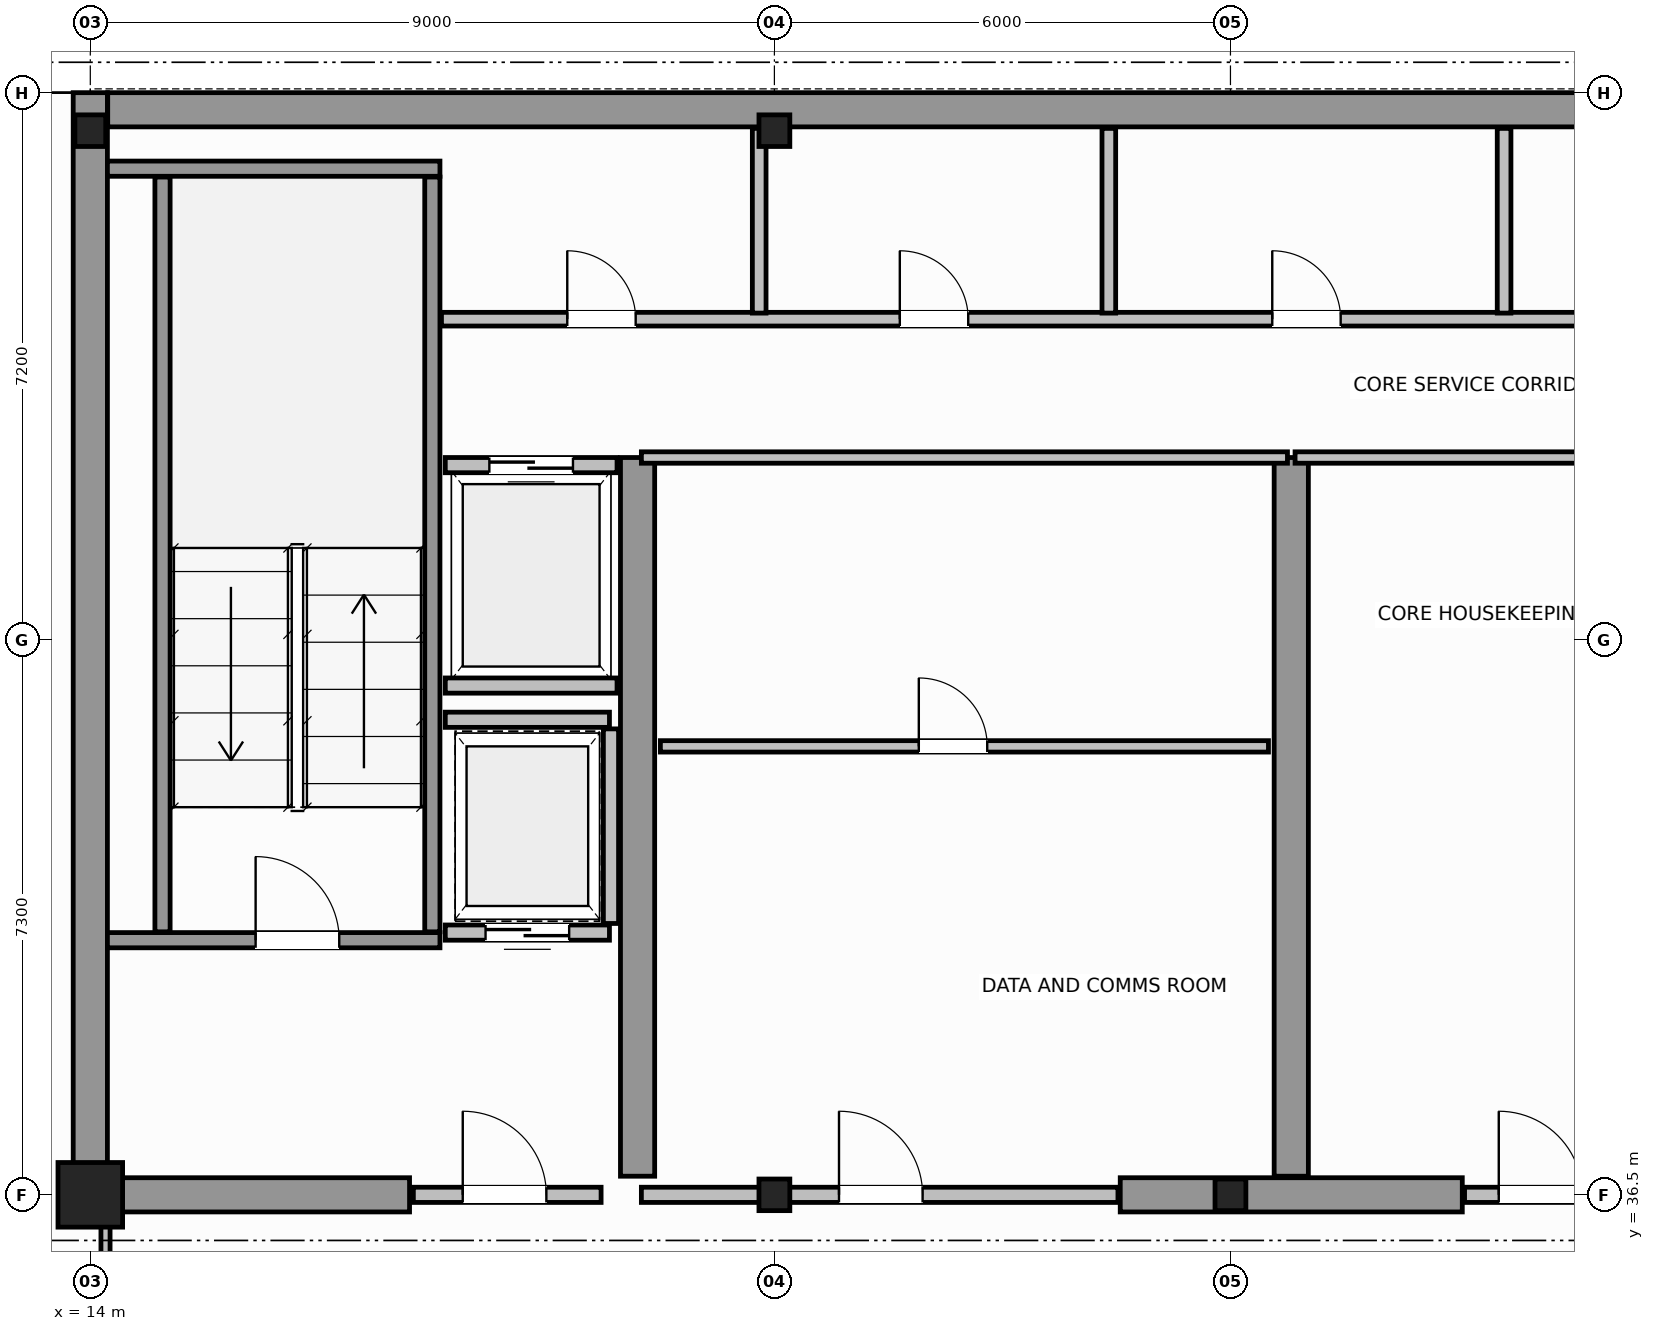
"""IFC4 building model, lengths in metres.
Left out: names, types, materials, properties, quantities, classifications, styles, units other than length and angle.
Written with IfcOpenShell. Run it as: python <this file> out.ifc"""

import sys

from ifc_helpers import new_model, si_unit, direction, frame, frame_2d, origin, origin_2d, place, context, subcontext, project, spatial, rectangle, i_section, extrude, source, transform, mapped, element, fill, save


model = new_model("IFC4")
c1 = context("Model", 3, precision=1e-05, world=origin(), true_north=direction((0.0, 1.0)))
c2 = subcontext(c1, "Body", "Model", "MODEL_VIEW")
j1 = project(units=[si_unit("LENGTHUNIT", "METRE"), si_unit("PLANEANGLEUNIT", "RADIAN")], contexts=[c1])
p1 = place(None, origin())
s1 = spatial("IfcSite", under=j1, at=p1, CompositionType="ELEMENT")
p2 = place(p1, origin())
s2 = spatial("IfcBuilding", under=s1, at=p2, CompositionType="ELEMENT")
p3 = place(p2, frame((0.0, 0.0, 280.2)))
s3 = spatial("IfcBuildingStorey", under=s2, at=p3, CompositionType="ELEMENT", Elevation=280.2)
m1 = source(origin(), c2, "Body", "SweptSolid", [
    extrude(rectangle(XDim=0.85, YDim=0.85, at=origin_2d()), origin(), (0.0, 0.0, 1.0), 3.8),
])
p4 = place(p3, frame((14.0, 36.5, 0.0), z_axis=(0.0, 0.0, 1.0), x_axis=(1.0, 0.0, 0.0)))
e1 = element("IfcColumn", 1, at=p4, inside=s3, PredefinedType="COLUMN", context=c2, shape_type="MappedRepresentation", body=[
    mapped(m1, transform((0.0, 0.0, 0.0), scale=1.0)),
])
m2 = source(origin(), c2, "Body", "SweptSolid", [
    extrude(i_section(OverallWidth=0.406, OverallDepth=0.416, WebThickness=0.03, FlangeThickness=0.042, FilletRadius=0.015, at=origin_2d()), origin(), (0.0, 0.0, 1.0), 3.8),
])
for number, where, z_axis, x_axis in (
    (2, (23.0, 36.5, 0.0), (0.0, 0.0, 1.0), (1.0, 0.0, 0.0)),
    (3, (29.0, 36.5, 0.0), (0.0, 0.0, 1.0), (1.0, 0.0, 0.0)),
    (4, (14.0, 50.5, 0.0), (0.0, 0.0, 1.0), (1.0, 0.0, 0.0)),
    (5, (23.0, 50.5, 0.0), (0.0, 0.0, 1.0), (1.0, 0.0, 0.0)),
):
    element("IfcColumn", number, at=place(p3, frame(where, z_axis=z_axis, x_axis=x_axis)), inside=s3, PredefinedType="COLUMN", context=c2, shape_type="MappedRepresentation", body=[
        mapped(m2, transform((0.0, 0.0, 0.0), scale=1.0)),
    ])
p5 = place(p3, frame((14.229, 50.775, 0.0), z_axis=(0.0, 0.0, 1.0), x_axis=(1.0, 0.0, 0.0)))
e6 = element("IfcWall", 6, at=p5, inside=s3, PredefinedType="SHEAR", context=c2, shape_type="SweptSolid", body=[
    extrude(rectangle(XDim=19.769, YDim=0.45, at=frame_2d((9.885, 0.0))), origin(), (0.0, 0.0, 1.0), 3.8),
])
p6 = place(p3, frame((14.0, 36.5, 0.0), z_axis=(0.0, 0.0, 1.0), x_axis=(0.0, 1.0, 0.0)))
e7 = element("IfcWall", 7, at=p6, inside=s3, PredefinedType="SHEAR", context=c2, shape_type="SweptSolid", body=[
    extrude(rectangle(XDim=14.5, YDim=0.45, at=frame_2d((7.25, 0.0))), origin(), (0.0, 0.0, 1.0), 3.8),
])
p7 = place(p3, frame((14.245, 36.5, 0.0), z_axis=(0.0, 0.0, 1.0), x_axis=(1.0, 0.0, 0.0)))
e8 = element("IfcWall", 8, at=p7, inside=s3, PredefinedType="SHEAR", context=c2, shape_type="SweptSolid", body=[
    extrude(rectangle(XDim=3.955, YDim=0.45, at=frame_2d((1.978, 0.0))), origin(), (0.0, 0.0, 1.0), 2.58),
])
p8 = place(p3, frame((27.55, 36.5, 0.0), z_axis=(0.0, 0.0, 1.0), x_axis=(1.0, 0.0, 0.0)))
e9 = element("IfcWall", 9, at=p8, inside=s3, PredefinedType="SHEAR", context=c2, shape_type="SweptSolid", body=[
    extrude(rectangle(XDim=4.5, YDim=0.45, at=frame_2d((2.25, 0.0))), origin(), (0.0, 0.0, 1.0), 3.8),
])
for number, where, z_axis, x_axis in (
    (10, (21.2, 36.745, 0.0), (0.0, 0.0, 1.0), (0.0, 1.0, 0.0)),
    (11, (29.8, 36.745, 0.0), (0.0, 0.0, 1.0), (0.0, 1.0, 0.0)),
):
    element("IfcWall", number, at=place(p3, frame(where, z_axis=z_axis, x_axis=x_axis)), inside=s3, PredefinedType="SHEAR", context=c2, shape_type="SweptSolid", body=[
        extrude(rectangle(XDim=9.455, YDim=0.45, at=frame_2d((4.728, 0.0))), origin(), (0.0, 0.0, 1.0), 3.8),
    ])
p9 = place(p3, frame((14.225, 39.85, 0.0), z_axis=(0.0, 0.0, 1.0), x_axis=(1.0, 0.0, 0.0)))
e12 = element("IfcWall", 12, at=p9, inside=s3, PredefinedType="SOLIDWALL", context=c2, shape_type="SweptSolid", body=[
    extrude(rectangle(XDim=4.375, YDim=0.2, at=frame_2d((2.188, 0.0))), origin(), (0.0, 0.0, 1.0), 3.8),
])
p10 = place(p9, frame((1.95, 0.0, 0.0)))
e13 = element("IfcOpeningElement", 13, at=p10, cuts=e12, PredefinedType="OPENING", context=c2, shape_type="SweptSolid", body=[
    extrude(rectangle(XDim=1.1, YDim=2.15, at=frame_2d((0.55, 1.075))), frame((0.0, 0.11, 0.0), z_axis=(0.0, -1.0, 0.0), x_axis=(1.0, 0.0, 0.0)), (0.0, 0.0, 1.0), 0.22),
])
p11 = place(p3, frame((14.225, 50.0, 0.0), z_axis=(0.0, 0.0, 1.0), x_axis=(1.0, 0.0, 0.0)))
e14 = element("IfcWall", 14, at=p11, inside=s3, PredefinedType="SOLIDWALL", context=c2, shape_type="SweptSolid", body=[
    extrude(rectangle(XDim=4.375, YDim=0.2, at=frame_2d((2.188, 0.0))), origin(), (0.0, 0.0, 1.0), 3.8),
])
for number, where, z_axis, x_axis in (
    (15, (14.95, 39.96, 0.0), (0.0, 0.0, 1.0), (0.0, 1.0, 0.0)),
    (16, (18.5, 39.96, 0.0), (0.0, 0.0, 1.0), (0.0, 1.0, 0.0)),
):
    element("IfcWall", number, at=place(p3, frame(where, z_axis=z_axis, x_axis=x_axis)), inside=s3, PredefinedType="SOLIDWALL", context=c2, shape_type="SweptSolid", body=[
        extrude(rectangle(XDim=9.93, YDim=0.2, at=frame_2d((4.965, 0.0))), origin(), (0.0, 0.0, 1.0), 3.8),
    ])
p12 = place(p3, frame((18.25, 36.5, 0.0), z_axis=(0.0, 0.0, 1.0), x_axis=(1.0, 0.0, 0.0)))
e17 = element("IfcWall", 17, at=p12, inside=s3, PredefinedType="SOLIDWALL", context=c2, shape_type="SweptSolid", body=[
    extrude(rectangle(XDim=2.47, YDim=0.2, at=frame_2d((1.235, 0.0))), origin(), (0.0, 0.0, 1.0), 2.57),
])
p13 = place(p12, frame((0.65, 0.0, 0.0)))
e18 = element("IfcOpeningElement", 18, at=p13, cuts=e17, PredefinedType="OPENING", context=c2, shape_type="SweptSolid", body=[
    extrude(rectangle(XDim=1.1, YDim=2.15, at=frame_2d((0.55, 1.075))), frame((0.0, 0.11, 0.0), z_axis=(0.0, -1.0, 0.0), x_axis=(1.0, 0.0, 0.0)), (0.0, 0.0, 1.0), 0.22),
])
p14 = place(p3, frame((18.67, 46.1, 0.0), z_axis=(0.0, 0.0, 1.0), x_axis=(1.0, 0.0, 0.0)))
e19 = element("IfcWall", 19, at=p14, inside=s3, PredefinedType="SOLIDWALL", context=c2, shape_type="SweptSolid", body=[
    extrude(rectangle(XDim=2.26, YDim=0.2, at=frame_2d((1.13, 0.0))), origin(), (0.0, 0.0, 1.0), 3.58),
])
p15 = place(p14, frame((0.58, 0.0, 0.0)))
e20 = element("IfcOpeningElement", 20, at=p15, cuts=e19, PredefinedType="OPENING", context=c2, shape_type="SweptSolid", body=[
    extrude(rectangle(XDim=1.1, YDim=2.15, at=frame_2d((0.55, 1.075))), frame((0.0, 0.11, 0.0), z_axis=(0.0, -1.0, 0.0), x_axis=(1.0, 0.0, 0.0)), (0.0, 0.0, 1.0), 0.22),
])
p16 = place(p3, frame((18.67, 43.2, 0.0), z_axis=(0.0, 0.0, 1.0), x_axis=(1.0, 0.0, 0.0)))
e21 = element("IfcWall", 21, at=p16, inside=s3, PredefinedType="SOLIDWALL", context=c2, shape_type="SweptSolid", body=[
    extrude(rectangle(XDim=2.26, YDim=0.2, at=frame_2d((1.13, 0.0))), origin(), (0.0, 0.0, 1.0), 3.58),
])
p17 = place(p3, frame((18.67, 39.95, 0.0), z_axis=(0.0, 0.0, 1.0), x_axis=(1.0, 0.0, 0.0)))
e22 = element("IfcWall", 22, at=p17, inside=s3, PredefinedType="SOLIDWALL", context=c2, shape_type="SweptSolid", body=[
    extrude(rectangle(XDim=2.16, YDim=0.2, at=frame_2d((1.08, 0.0))), origin(), (0.0, 0.0, 1.0), 3.58),
])
p18 = place(p17, frame((0.53, 0.0, 0.0)))
e23 = element("IfcOpeningElement", 23, at=p18, cuts=e22, PredefinedType="OPENING", context=c2, shape_type="SweptSolid", body=[
    extrude(rectangle(XDim=1.1, YDim=2.15, at=frame_2d((0.55, 1.075))), frame((0.0, 0.11, 0.0), z_axis=(0.0, -1.0, 0.0), x_axis=(1.0, 0.0, 0.0)), (0.0, 0.0, 1.0), 0.22),
])
p19 = place(p3, frame((18.67, 42.75, 0.0), z_axis=(0.0, 0.0, 1.0), x_axis=(1.0, 0.0, 0.0)))
e24 = element("IfcWall", 24, at=p19, inside=s3, PredefinedType="SOLIDWALL", context=c2, shape_type="SweptSolid", body=[
    extrude(rectangle(XDim=2.16, YDim=0.2, at=frame_2d((1.08, 0.0))), origin(), (0.0, 0.0, 1.0), 3.58),
])
p20 = place(p3, frame((20.85, 40.07, 0.0), z_axis=(0.0, 0.0, 1.0), x_axis=(0.0, 1.0, 0.0)))
e25 = element("IfcWall", 25, at=p20, inside=s3, PredefinedType="SOLIDWALL", context=c2, shape_type="SweptSolid", body=[
    extrude(rectangle(XDim=2.56, YDim=0.2, at=frame_2d((1.28, 0.0))), origin(), (0.0, 0.0, 1.0), 3.58),
])
p21 = place(p3, frame((21.25, 36.5, 0.0), z_axis=(0.0, 0.0, 1.0), x_axis=(1.0, 0.0, 0.0)))
e26 = element("IfcWall", 26, at=p21, inside=s3, PredefinedType="SOLIDWALL", context=c2, shape_type="SweptSolid", body=[
    extrude(rectangle(XDim=6.27, YDim=0.2, at=frame_2d((3.135, 0.0))), origin(), (0.0, 0.0, 1.0), 2.57),
])
p22 = place(p21, frame((2.6, 0.0, 0.0)))
e27 = element("IfcOpeningElement", 27, at=p22, cuts=e26, PredefinedType="OPENING", context=c2, shape_type="SweptSolid", body=[
    extrude(rectangle(XDim=1.1, YDim=2.15, at=frame_2d((0.55, 1.075))), frame((0.0, 0.11, 0.0), z_axis=(0.0, -1.0, 0.0), x_axis=(1.0, 0.0, 0.0)), (0.0, 0.0, 1.0), 0.22),
])
p23 = place(p3, frame((21.25, 46.2, 0.0), z_axis=(0.0, 0.0, 1.0), x_axis=(1.0, 0.0, 0.0)))
e28 = element("IfcWall", 28, at=p23, inside=s3, PredefinedType="PARTITIONING", context=c2, shape_type="SweptSolid", body=[
    extrude(rectangle(XDim=8.5, YDim=0.15, at=frame_2d((4.25, 0.0))), origin(), (0.0, 0.0, 1.0), 3.58),
])
p24 = place(p3, frame((21.5, 42.4, 0.0), z_axis=(0.0, 0.0, 1.0), x_axis=(1.0, 0.0, 0.0)))
e29 = element("IfcWall", 29, at=p24, inside=s3, PredefinedType="PARTITIONING", context=c2, shape_type="SweptSolid", body=[
    extrude(rectangle(XDim=8.0, YDim=0.15, at=frame_2d((4.0, 0.0))), origin(), (0.0, 0.0, 1.0), 3.58),
])
p25 = place(p24, frame((3.4, 0.0, 0.0)))
e30 = element("IfcOpeningElement", 30, at=p25, cuts=e29, PredefinedType="OPENING", context=c2, shape_type="SweptSolid", body=[
    extrude(rectangle(XDim=0.9, YDim=2.1, at=frame_2d((0.45, 1.05))), frame((0.0, 0.085, 0.0), z_axis=(0.0, -1.0, 0.0), x_axis=(1.0, 0.0, 0.0)), (0.0, 0.0, 1.0), 0.17),
])
p26 = place(p3, frame((32.08, 36.5, 0.0), z_axis=(0.0, 0.0, 1.0), x_axis=(1.0, 0.0, 0.0)))
e31 = element("IfcWall", 31, at=p26, inside=s3, PredefinedType="SOLIDWALL", context=c2, shape_type="SweptSolid", body=[
    extrude(rectangle(XDim=4.04, YDim=0.2, at=frame_2d((2.02, 0.0))), origin(), (0.0, 0.0, 1.0), 3.12),
])
p27 = place(p26, frame((0.45, 0.0, 0.0)))
e32 = element("IfcOpeningElement", 32, at=p27, cuts=e31, PredefinedType="OPENING", context=c2, shape_type="SweptSolid", body=[
    extrude(rectangle(XDim=1.1, YDim=2.15, at=frame_2d((0.55, 1.075))), frame((0.0, 0.11, 0.0), z_axis=(0.0, -1.0, 0.0), x_axis=(1.0, 0.0, 0.0)), (0.0, 0.0, 1.0), 0.22),
])
p28 = place(p3, frame((29.85, 46.2, 0.0), z_axis=(0.0, 0.0, 1.0), x_axis=(1.0, 0.0, 0.0)))
e33 = element("IfcWall", 33, at=p28, inside=s3, PredefinedType="PARTITIONING", context=c2, shape_type="SweptSolid", body=[
    extrude(rectangle(XDim=8.5, YDim=0.15, at=frame_2d((4.25, 0.0))), origin(), (0.0, 0.0, 1.0), 3.58),
])
p29 = place(p3, frame((18.62, 48.02, 0.0), z_axis=(0.0, 0.0, 1.0), x_axis=(1.0, 0.0, 0.0)))
e34 = element("IfcWall", 34, at=p29, inside=s3, PredefinedType="PLUMBINGWALL", context=c2, shape_type="SweptSolid", body=[
    extrude(rectangle(XDim=30.76, YDim=0.18, at=frame_2d((15.38, 0.0))), origin(), (0.0, 0.0, 1.0), 3.58),
])
p30 = place(p29, frame((1.655, 0.0, 0.0)))
e35 = element("IfcOpeningElement", 35, at=p30, cuts=e34, PredefinedType="OPENING", context=c2, shape_type="SweptSolid", body=[
    extrude(rectangle(XDim=0.9, YDim=2.15, at=frame_2d((0.45, 1.075))), frame((0.0, 0.1, 0.0), z_axis=(0.0, -1.0, 0.0), x_axis=(1.0, 0.0, 0.0)), (0.0, 0.0, 1.0), 0.2),
])
p31 = place(p29, frame((6.03, 0.0, 0.0)))
e36 = element("IfcOpeningElement", 36, at=p31, cuts=e34, PredefinedType="OPENING", context=c2, shape_type="SweptSolid", body=[
    extrude(rectangle(XDim=0.9, YDim=2.15, at=frame_2d((0.45, 1.075))), frame((0.0, 0.1, 0.0), z_axis=(0.0, -1.0, 0.0), x_axis=(1.0, 0.0, 0.0)), (0.0, 0.0, 1.0), 0.2),
])
p32 = place(p29, frame((10.93, 0.0, 0.0)))
e37 = element("IfcOpeningElement", 37, at=p32, cuts=e34, PredefinedType="OPENING", context=c2, shape_type="SweptSolid", body=[
    extrude(rectangle(XDim=0.9, YDim=2.15, at=frame_2d((0.45, 1.075))), frame((0.0, 0.1, 0.0), z_axis=(0.0, -1.0, 0.0), x_axis=(1.0, 0.0, 0.0)), (0.0, 0.0, 1.0), 0.2),
])
p33 = place(p29, frame((16.13, 0.0, 0.0)))
e38 = element("IfcOpeningElement", 38, at=p33, cuts=e34, PredefinedType="OPENING", context=c2, shape_type="SweptSolid", body=[
    extrude(rectangle(XDim=0.9, YDim=2.15, at=frame_2d((0.45, 1.075))), frame((0.0, 0.1, 0.0), z_axis=(0.0, -1.0, 0.0), x_axis=(1.0, 0.0, 0.0)), (0.0, 0.0, 1.0), 0.2),
])
p34 = place(p29, frame((21.73, 0.0, 0.0)))
e39 = element("IfcOpeningElement", 39, at=p34, cuts=e34, PredefinedType="OPENING", context=c2, shape_type="SweptSolid", body=[
    extrude(rectangle(XDim=0.9, YDim=2.15, at=frame_2d((0.45, 1.075))), frame((0.0, 0.1, 0.0), z_axis=(0.0, -1.0, 0.0), x_axis=(1.0, 0.0, 0.0)), (0.0, 0.0, 1.0), 0.2),
])
p35 = place(p29, frame((27.505, 0.0, 0.0)))
e40 = element("IfcOpeningElement", 40, at=p35, cuts=e34, PredefinedType="OPENING", context=c2, shape_type="SweptSolid", body=[
    extrude(rectangle(XDim=0.9, YDim=2.15, at=frame_2d((0.45, 1.075))), frame((0.0, 0.1, 0.0), z_axis=(0.0, -1.0, 0.0), x_axis=(1.0, 0.0, 0.0)), (0.0, 0.0, 1.0), 0.2),
])
p36 = place(p3, frame((22.8, 48.1, 0.0), z_axis=(0.0, 0.0, 1.0), x_axis=(0.0, 1.0, 0.0)))
e41 = element("IfcWall", 41, at=p36, inside=s3, PredefinedType="PLUMBINGWALL", context=c2, shape_type="SweptSolid", body=[
    extrude(rectangle(XDim=2.43, YDim=0.18, at=frame_2d((1.215, 0.0))), origin(), (0.0, 0.0, 1.0), 3.12),
])
for number, where, z_axis, x_axis in (
    (42, (27.4, 48.1, 0.0), (0.0, 0.0, 1.0), (0.0, 1.0, 0.0)),
    (43, (32.6, 48.1, 0.0), (0.0, 0.0, 1.0), (0.0, 1.0, 0.0)),
):
    element("IfcWall", number, at=place(p3, frame(where, z_axis=z_axis, x_axis=x_axis)), inside=s3, PredefinedType="PLUMBINGWALL", context=c2, shape_type="SweptSolid", body=[
        extrude(rectangle(XDim=2.43, YDim=0.18, at=frame_2d((1.215, 0.0))), origin(), (0.0, 0.0, 1.0), 3.58),
    ])
p37 = place(p3, frame((14.2, 34.0, 0.0), z_axis=(0.0, 0.0, 1.0), x_axis=(0.0, 1.0, 0.0)))
e44 = element("IfcWall", 44, at=p37, inside=s3, PredefinedType="PARTITIONING", context=c2, shape_type="SweptSolid", body=[
    extrude(rectangle(XDim=2.44, YDim=0.12, at=frame_2d((1.22, 0.0))), origin(), (0.0, 0.0, 1.0), 3.58),
])
p38 = place(p37, frame((0.7, 0.0, 0.0)))
e45 = element("IfcOpeningElement", 45, at=p38, cuts=e44, PredefinedType="OPENING", context=c2, shape_type="SweptSolid", body=[
    extrude(rectangle(XDim=0.9, YDim=2.15, at=frame_2d((0.45, 1.075))), frame((0.0, 0.07, 0.0), z_axis=(0.0, -1.0, 0.0), x_axis=(1.0, 0.0, 0.0)), (0.0, 0.0, 1.0), 0.14),
])
m3 = source(origin(), c2, "Body", "SweptSolid", [
    extrude(rectangle(XDim=1.1, YDim=2.15, at=frame_2d((0.55, 1.075))), frame((0.0, 0.025, 0.0), z_axis=(0.0, -1.0, 0.0), x_axis=(1.0, 0.0, 0.0)), (0.0, 0.0, 1.0), 0.05),
])
p39 = place(p10, origin())
e46 = element("IfcDoor", 46, at=p39, inside=s3, OperationType="SINGLE_SWING_LEFT", PredefinedType="DOOR", context=c2, shape_type="MappedRepresentation", body=[
    mapped(m3, transform((0.0, 0.0, 0.0), scale=1.0)),
])
fill(e13, e46)
p40 = place(p13, origin())
e47 = element("IfcDoor", 47, at=p40, inside=s3, OperationType="SINGLE_SWING_RIGHT", PredefinedType="DOOR", context=c2, shape_type="MappedRepresentation", body=[
    mapped(m3, transform((0.0, 0.0, 0.0), scale=1.0)),
])
fill(e18, e47)
p41 = place(p15, origin())
e48 = element("IfcDoor", 48, at=p41, inside=s3, OperationType="DOUBLE_DOOR_SLIDING", PredefinedType="DOOR", context=c2, shape_type="MappedRepresentation", body=[
    mapped(m3, transform((0.0, 0.0, 0.0), scale=1.0)),
])
fill(e20, e48)
p42 = place(p18, origin())
e49 = element("IfcDoor", 49, at=p42, inside=s3, OperationType="DOUBLE_DOOR_SLIDING", PredefinedType="DOOR", context=c2, shape_type="MappedRepresentation", body=[
    mapped(m3, transform((0.0, 0.0, 0.0), scale=1.0)),
])
fill(e23, e49)
p43 = place(p22, origin())
e50 = element("IfcDoor", 50, at=p43, inside=s3, OperationType="SINGLE_SWING_LEFT", PredefinedType="DOOR", context=c2, shape_type="MappedRepresentation", body=[
    mapped(m3, transform((0.0, 0.0, 0.0), scale=1.0)),
])
fill(e27, e50)
m4 = source(origin(), c2, "Body", "SweptSolid", [
    extrude(rectangle(XDim=0.9, YDim=2.1, at=frame_2d((0.45, 1.05))), frame((0.0, 0.025, 0.0), z_axis=(0.0, -1.0, 0.0), x_axis=(1.0, 0.0, 0.0)), (0.0, 0.0, 1.0), 0.05),
])
p44 = place(p25, origin())
e51 = element("IfcDoor", 51, at=p44, inside=s3, OperationType="SINGLE_SWING_RIGHT", PredefinedType="DOOR", context=c2, shape_type="MappedRepresentation", body=[
    mapped(m4, transform((0.0, 0.0, 0.0), scale=1.0)),
])
fill(e30, e51)
p45 = place(p27, origin())
e52 = element("IfcDoor", 52, at=p45, inside=s3, OperationType="SINGLE_SWING_LEFT", PredefinedType="DOOR", context=c2, shape_type="MappedRepresentation", body=[
    mapped(m3, transform((0.0, 0.0, 0.0), scale=1.0)),
])
fill(e32, e52)
m5 = source(origin(), c2, "Body", "SweptSolid", [
    extrude(rectangle(XDim=0.9, YDim=2.15, at=frame_2d((0.45, 1.075))), frame((0.0, 0.025, 0.0), z_axis=(0.0, -1.0, 0.0), x_axis=(1.0, 0.0, 0.0)), (0.0, 0.0, 1.0), 0.05),
])
p46 = place(p30, origin())
e53 = element("IfcDoor", 53, at=p46, inside=s3, OperationType="SINGLE_SWING_LEFT", PredefinedType="DOOR", context=c2, shape_type="MappedRepresentation", body=[
    mapped(m5, transform((0.0, 0.0, 0.0), scale=1.0)),
])
fill(e35, e53)
p47 = place(p31, origin())
e54 = element("IfcDoor", 54, at=p47, inside=s3, OperationType="SINGLE_SWING_RIGHT", PredefinedType="DOOR", context=c2, shape_type="MappedRepresentation", body=[
    mapped(m5, transform((0.0, 0.0, 0.0), scale=1.0)),
])
fill(e36, e54)
p48 = place(p32, origin())
e55 = element("IfcDoor", 55, at=p48, inside=s3, OperationType="SINGLE_SWING_LEFT", PredefinedType="DOOR", context=c2, shape_type="MappedRepresentation", body=[
    mapped(m5, transform((0.0, 0.0, 0.0), scale=1.0)),
])
fill(e37, e55)
save(model, sys.argv[1])
